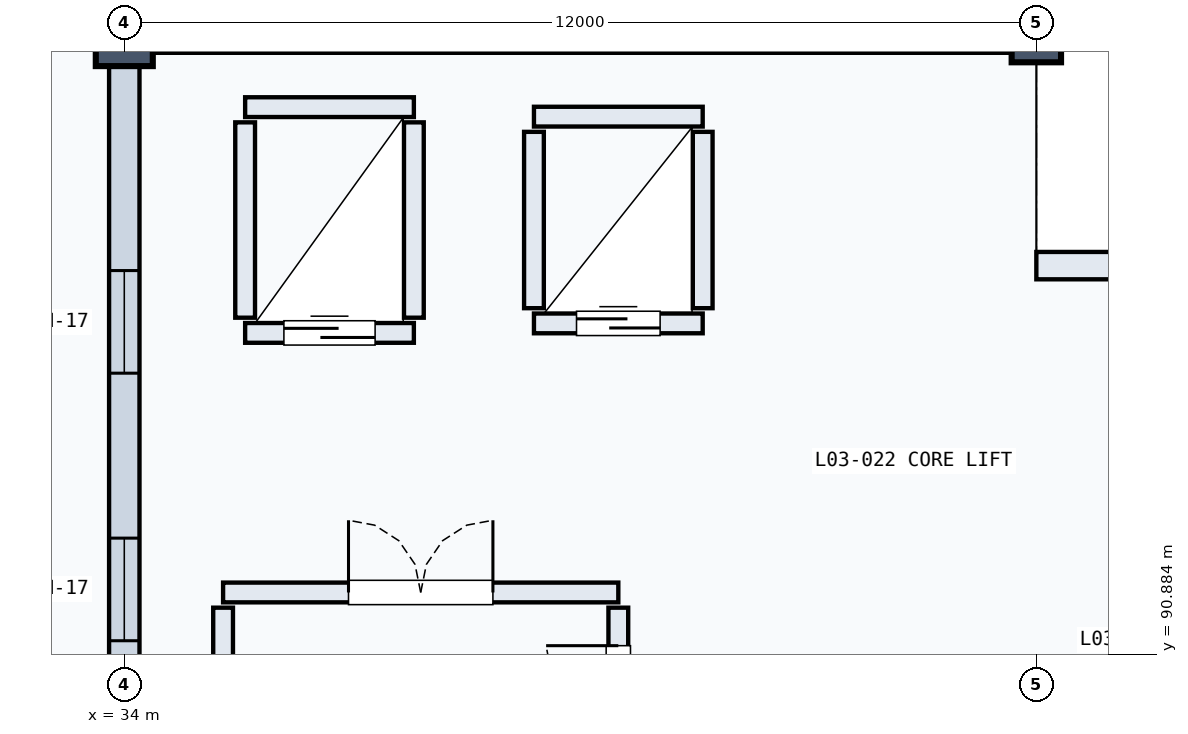
"""IFC4 building model, lengths in metres.
Left out: names, types, materials, properties, quantities, classifications, styles, units other than length and angle.
Written with IfcOpenShell. Run it as: python <this file> out.ifc"""

import sys

from ifc_helpers import new_model, si_unit, direction, frame, frame_2d, origin, origin_2d, place, context, subcontext, project, spatial, rectangle, circle, extrude, element, fill, save


model = new_model("IFC4")
c1 = context("Model", 3, precision=1e-05, world=origin(), true_north=direction((0.0, 1.0)))
c2 = subcontext(c1, "Body", "Model", "MODEL_VIEW")
j1 = project(units=[si_unit("LENGTHUNIT", "METRE"), si_unit("PLANEANGLEUNIT", "RADIAN")], contexts=[c1])
p1 = place(None, origin())
s1 = spatial("IfcSite", under=j1, at=p1, CompositionType="ELEMENT")
p2 = place(p1, origin())
s2 = spatial("IfcBuilding", under=s1, at=p2, CompositionType="ELEMENT")
p3 = place(p2, frame((0.0, 0.0, 14.7)))
s3 = spatial("IfcBuildingStorey", under=s2, at=p3, CompositionType="ELEMENT", Elevation=14.7)
p4 = place(p3, frame((34.0, 99.0, 0.0), z_axis=(0.0, 0.0, 1.0), x_axis=(1.0, 0.0, 0.0)))
e1 = element("IfcColumn", 1, at=p4, inside=s3, PredefinedType="COLUMN", context=c2, shape_type="SweptSolid", body=[
    extrude(circle(Radius=0.375, at=origin_2d()), origin(), (0.0, 0.0, 1.0), 4.8),
])
p5 = place(p3, frame((46.0, 99.0, 0.0), z_axis=(0.0, 0.0, 1.0), x_axis=(1.0, 0.0, 0.0)))
e2 = element("IfcColumn", 2, at=p5, inside=s3, PredefinedType="COLUMN", context=c2, shape_type="SweptSolid", body=[
    extrude(circle(Radius=0.325, at=origin_2d()), origin(), (0.0, 0.0, 1.0), 4.8),
])
p6 = place(p3, frame((34.22, 99.0, 0.0), z_axis=(0.0, 0.0, 1.0), x_axis=(1.0, 0.0, 0.0)))
e3 = element("IfcWall", 3, at=p6, inside=s3, PredefinedType="SOLIDWALL", context=c2, shape_type="SweptSolid", body=[
    extrude(rectangle(XDim=11.56, YDim=0.4, at=frame_2d((5.78, 0.0))), origin(), (0.0, 0.0, 1.0), 3.49),
])
p7 = place(p6, frame((3.178, 0.0, 0.8)))
e4 = element("IfcOpeningElement", 4, at=p7, cuts=e3, PredefinedType="OPENING", context=c2, shape_type="SweptSolid", body=[
    extrude(rectangle(XDim=1.35, YDim=2.1, at=frame_2d((0.675, 1.05))), frame((0.0, 0.21, 0.0), z_axis=(0.0, -1.0, 0.0), x_axis=(1.0, 0.0, 0.0)), (0.0, 0.0, 1.0), 0.42),
])
p8 = place(p6, frame((7.032, 0.0, 0.8)))
e5 = element("IfcOpeningElement", 5, at=p8, cuts=e3, PredefinedType="OPENING", context=c2, shape_type="SweptSolid", body=[
    extrude(rectangle(XDim=1.35, YDim=2.1, at=frame_2d((0.675, 1.05))), frame((0.0, 0.21, 0.0), z_axis=(0.0, -1.0, 0.0), x_axis=(1.0, 0.0, 0.0)), (0.0, 0.0, 1.0), 0.42),
])
p9 = place(p3, frame((34.0, 88.22, 0.0), z_axis=(0.0, 0.0, 1.0), x_axis=(0.0, 1.0, 0.0)))
e6 = element("IfcWall", 6, at=p9, inside=s3, PredefinedType="SOLIDWALL", context=c2, shape_type="SweptSolid", body=[
    extrude(rectangle(XDim=10.56, YDim=0.4, at=frame_2d((5.28, 0.0))), origin(), (0.0, 0.0, 1.0), 3.79),
])
p10 = place(p9, frame((2.845, 0.0, 0.8)))
e7 = element("IfcOpeningElement", 7, at=p10, cuts=e6, PredefinedType="OPENING", context=c2, shape_type="SweptSolid", body=[
    extrude(rectangle(XDim=1.35, YDim=2.1, at=frame_2d((0.675, 1.05))), frame((0.0, 0.21, 0.0), z_axis=(0.0, -1.0, 0.0), x_axis=(1.0, 0.0, 0.0)), (0.0, 0.0, 1.0), 0.42),
])
p11 = place(p9, frame((6.365, 0.0, 0.8)))
e8 = element("IfcOpeningElement", 8, at=p11, cuts=e6, PredefinedType="OPENING", context=c2, shape_type="SweptSolid", body=[
    extrude(rectangle(XDim=1.35, YDim=2.1, at=frame_2d((0.675, 1.05))), frame((0.0, 0.21, 0.0), z_axis=(0.0, -1.0, 0.0), x_axis=(1.0, 0.0, 0.0)), (0.0, 0.0, 1.0), 0.42),
])
p12 = place(p3, frame((46.0, 96.0, 0.0), z_axis=(0.0, 0.0, 1.0), x_axis=(1.0, 0.0, 0.0)))
e9 = element("IfcWall", 9, at=p12, inside=s3, PredefinedType="SOLIDWALL", context=c2, shape_type="SweptSolid", body=[
    extrude(rectangle(XDim=12.0, YDim=0.36, at=frame_2d((6.0, 0.0))), origin(), (0.0, 0.0, 1.0), 3.49),
])
p13 = place(p12, frame((2.2, 0.0, 0.9)))
e10 = element("IfcOpeningElement", 10, at=p13, cuts=e9, PredefinedType="OPENING", context=c2, shape_type="SweptSolid", body=[
    extrude(rectangle(XDim=1.6, YDim=1.65, at=frame_2d((0.8, 0.825))), frame((0.0, 0.19, 0.0), z_axis=(0.0, -1.0, 0.0), x_axis=(1.0, 0.0, 0.0)), (0.0, 0.0, 1.0), 0.38),
])
p14 = place(p12, frame((5.2, 0.0, 0.9)))
e11 = element("IfcOpeningElement", 11, at=p14, cuts=e9, PredefinedType="OPENING", context=c2, shape_type="SweptSolid", body=[
    extrude(rectangle(XDim=1.6, YDim=1.65, at=frame_2d((0.8, 0.825))), frame((0.0, 0.19, 0.0), z_axis=(0.0, -1.0, 0.0), x_axis=(1.0, 0.0, 0.0)), (0.0, 0.0, 1.0), 0.38),
])
p15 = place(p12, frame((8.2, 0.0, 0.9)))
e12 = element("IfcOpeningElement", 12, at=p15, cuts=e9, PredefinedType="OPENING", context=c2, shape_type="SweptSolid", body=[
    extrude(rectangle(XDim=1.6, YDim=1.65, at=frame_2d((0.8, 0.825))), frame((0.0, 0.19, 0.0), z_axis=(0.0, -1.0, 0.0), x_axis=(1.0, 0.0, 0.0)), (0.0, 0.0, 1.0), 0.38),
])
p16 = place(p3, frame((35.59, 95.115, 0.0), z_axis=(0.0, 0.0, 1.0), x_axis=(1.0, 0.0, 0.0)))
e13 = element("IfcWall", 13, at=p16, inside=s3, PredefinedType="SOLIDWALL", context=c2, shape_type="SweptSolid", body=[
    extrude(rectangle(XDim=2.22, YDim=0.26, at=frame_2d((1.11, 0.0))), origin(), (0.0, 0.0, 1.0), 4.46),
])
p17 = place(p16, frame((0.51, 0.0, 0.0)))
e14 = element("IfcOpeningElement", 14, at=p17, cuts=e13, PredefinedType="OPENING", context=c2, shape_type="SweptSolid", body=[
    extrude(rectangle(XDim=1.2, YDim=2.2, at=frame_2d((0.6, 1.1))), frame((0.0, 0.14, 0.0), z_axis=(0.0, -1.0, 0.0), x_axis=(1.0, 0.0, 0.0)), (0.0, 0.0, 1.0), 0.28),
])
p18 = place(p3, frame((35.59, 98.085, 0.0), z_axis=(0.0, 0.0, 1.0), x_axis=(1.0, 0.0, 0.0)))
e15 = element("IfcWall", 15, at=p18, inside=s3, PredefinedType="SOLIDWALL", context=c2, shape_type="SweptSolid", body=[
    extrude(rectangle(XDim=2.22, YDim=0.26, at=frame_2d((1.11, 0.0))), origin(), (0.0, 0.0, 1.0), 4.46),
])
for number, where, z_axis, x_axis in (
    (16, (35.59, 95.315, 0.0), (0.0, 0.0, 1.0), (0.0, 1.0, 0.0)),
    (17, (37.81, 95.315, 0.0), (0.0, 0.0, 1.0), (0.0, 1.0, 0.0)),
):
    element("IfcWall", number, at=place(p3, frame(where, z_axis=z_axis, x_axis=x_axis)), inside=s3, PredefinedType="SOLIDWALL", context=c2, shape_type="SweptSolid", body=[
        extrude(rectangle(XDim=2.57, YDim=0.26, at=frame_2d((1.285, 0.0))), origin(), (0.0, 0.0, 1.0), 4.46),
    ])
p19 = place(p3, frame((39.39, 95.24, 0.0), z_axis=(0.0, 0.0, 1.0), x_axis=(1.0, 0.0, 0.0)))
e18 = element("IfcWall", 18, at=p19, inside=s3, PredefinedType="SOLIDWALL", context=c2, shape_type="SweptSolid", body=[
    extrude(rectangle(XDim=2.22, YDim=0.26, at=frame_2d((1.11, 0.0))), origin(), (0.0, 0.0, 1.0), 4.46),
])
p20 = place(p19, frame((0.56, 0.0, 0.0)))
e19 = element("IfcOpeningElement", 19, at=p20, cuts=e18, PredefinedType="OPENING", context=c2, shape_type="SweptSolid", body=[
    extrude(rectangle(XDim=1.1, YDim=2.15, at=frame_2d((0.55, 1.075))), frame((0.0, 0.14, 0.0), z_axis=(0.0, -1.0, 0.0), x_axis=(1.0, 0.0, 0.0)), (0.0, 0.0, 1.0), 0.28),
])
p21 = place(p3, frame((39.39, 97.96, 0.0), z_axis=(0.0, 0.0, 1.0), x_axis=(1.0, 0.0, 0.0)))
e20 = element("IfcWall", 20, at=p21, inside=s3, PredefinedType="SOLIDWALL", context=c2, shape_type="SweptSolid", body=[
    extrude(rectangle(XDim=2.22, YDim=0.26, at=frame_2d((1.11, 0.0))), origin(), (0.0, 0.0, 1.0), 4.46),
])
for number, where, z_axis, x_axis in (
    (21, (39.39, 95.44, 0.0), (0.0, 0.0, 1.0), (0.0, 1.0, 0.0)),
    (22, (41.61, 95.44, 0.0), (0.0, 0.0, 1.0), (0.0, 1.0, 0.0)),
):
    element("IfcWall", number, at=place(p3, frame(where, z_axis=z_axis, x_axis=x_axis)), inside=s3, PredefinedType="SOLIDWALL", context=c2, shape_type="SweptSolid", body=[
        extrude(rectangle(XDim=2.32, YDim=0.26, at=frame_2d((1.16, 0.0))), origin(), (0.0, 0.0, 1.0), 4.46),
    ])
p22 = place(p3, frame((35.3, 91.7, 0.0), z_axis=(0.0, 0.0, 1.0), x_axis=(1.0, 0.0, 0.0)))
e23 = element("IfcWall", 23, at=p22, inside=s3, PredefinedType="SOLIDWALL", context=c2, shape_type="SweptSolid", body=[
    extrude(rectangle(XDim=5.2, YDim=0.26, at=frame_2d((2.6, 0.0))), origin(), (0.0, 0.0, 1.0), 4.46),
])
p23 = place(p22, frame((1.65, 0.0, 0.0)))
e24 = element("IfcOpeningElement", 24, at=p23, cuts=e23, PredefinedType="OPENING", context=c2, shape_type="SweptSolid", body=[
    extrude(rectangle(XDim=1.9, YDim=2.2, at=frame_2d((0.95, 1.1))), frame((0.0, 0.14, 0.0), z_axis=(0.0, -1.0, 0.0), x_axis=(1.0, 0.0, 0.0)), (0.0, 0.0, 1.0), 0.28),
])
p24 = place(p3, frame((35.3, 88.6, 0.0), z_axis=(0.0, 0.0, 1.0), x_axis=(0.0, 1.0, 0.0)))
e25 = element("IfcWall", 25, at=p24, inside=s3, PredefinedType="SOLIDWALL", context=c2, shape_type="SweptSolid", body=[
    extrude(rectangle(XDim=2.9, YDim=0.26, at=frame_2d((1.45, 0.0))), origin(), (0.0, 0.0, 1.0), 4.46),
])
p25 = place(p3, frame((40.5, 88.6, 0.0), z_axis=(0.0, 0.0, 1.0), x_axis=(0.0, 1.0, 0.0)))
e26 = element("IfcWall", 26, at=p25, inside=s3, PredefinedType="SOLIDWALL", context=c2, shape_type="SweptSolid", body=[
    extrude(rectangle(XDim=2.9, YDim=0.26, at=frame_2d((1.45, 0.0))), origin(), (0.0, 0.0, 1.0), 4.46),
])
p26 = place(p25, frame((0.5, 0.0, 0.0)))
e27 = element("IfcOpeningElement", 27, at=p26, cuts=e26, PredefinedType="OPENING", context=c2, shape_type="SweptSolid", body=[
    extrude(rectangle(XDim=1.9, YDim=2.2, at=frame_2d((0.95, 1.1))), frame((0.0, 0.14, 0.0), z_axis=(0.0, -1.0, 0.0), x_axis=(1.0, 0.0, 0.0)), (0.0, 0.0, 1.0), 0.28),
])
p27 = place(p10, origin())
e28 = element("IfcWindow", 28, at=p27, inside=s3, PartitioningType="SINGLE_PANEL", PredefinedType="WINDOW", context=c2, shape_type="SweptSolid", body=[
    extrude(rectangle(XDim=1.35, YDim=2.1, at=frame_2d((0.675, 1.05))), frame((0.0, 0.03, 0.0), z_axis=(0.0, -1.0, 0.0), x_axis=(1.0, 0.0, 0.0)), (0.0, 0.0, 1.0), 0.06),
])
fill(e7, e28)
p28 = place(p11, origin())
e29 = element("IfcWindow", 29, at=p28, inside=s3, PartitioningType="SINGLE_PANEL", PredefinedType="WINDOW", context=c2, shape_type="SweptSolid", body=[
    extrude(rectangle(XDim=1.35, YDim=2.1, at=frame_2d((0.675, 1.05))), frame((0.0, 0.03, 0.0), z_axis=(0.0, -1.0, 0.0), x_axis=(1.0, 0.0, 0.0)), (0.0, 0.0, 1.0), 0.06),
])
fill(e8, e29)
p29 = place(p17, origin())
e30 = element("IfcDoor", 30, at=p29, inside=s3, OperationType="SLIDING_TO_LEFT", PredefinedType="DOOR", context=c2, shape_type="SweptSolid", body=[
    extrude(rectangle(XDim=1.2, YDim=2.2, at=frame_2d((0.6, 1.1))), frame((0.0, 0.025, 0.0), z_axis=(0.0, -1.0, 0.0), x_axis=(1.0, 0.0, 0.0)), (0.0, 0.0, 1.0), 0.05),
])
fill(e14, e30)
p30 = place(p20, origin())
e31 = element("IfcDoor", 31, at=p30, inside=s3, OperationType="SLIDING_TO_LEFT", PredefinedType="DOOR", context=c2, shape_type="SweptSolid", body=[
    extrude(rectangle(XDim=1.1, YDim=2.15, at=frame_2d((0.55, 1.075))), frame((0.0, 0.025, 0.0), z_axis=(0.0, -1.0, 0.0), x_axis=(1.0, 0.0, 0.0)), (0.0, 0.0, 1.0), 0.05),
])
fill(e19, e31)
p31 = place(p23, origin())
e32 = element("IfcDoor", 32, at=p31, inside=s3, OperationType="DOUBLE_DOOR_SINGLE_SWING", PredefinedType="DOOR", context=c2, shape_type="SweptSolid", body=[
    extrude(rectangle(XDim=1.9, YDim=2.2, at=frame_2d((0.95, 1.1))), frame((0.0, 0.025, 0.0), z_axis=(0.0, -1.0, 0.0), x_axis=(1.0, 0.0, 0.0)), (0.0, 0.0, 1.0), 0.05),
])
fill(e24, e32)
p32 = place(p26, origin())
e33 = element("IfcDoor", 33, at=p32, inside=s3, OperationType="DOUBLE_DOOR_SINGLE_SWING", PredefinedType="DOOR", context=c2, shape_type="SweptSolid", body=[
    extrude(rectangle(XDim=1.9, YDim=2.2, at=frame_2d((0.95, 1.1))), frame((0.0, 0.025, 0.0), z_axis=(0.0, -1.0, 0.0), x_axis=(1.0, 0.0, 0.0)), (0.0, 0.0, 1.0), 0.05),
])
fill(e27, e33)
save(model, sys.argv[1])
